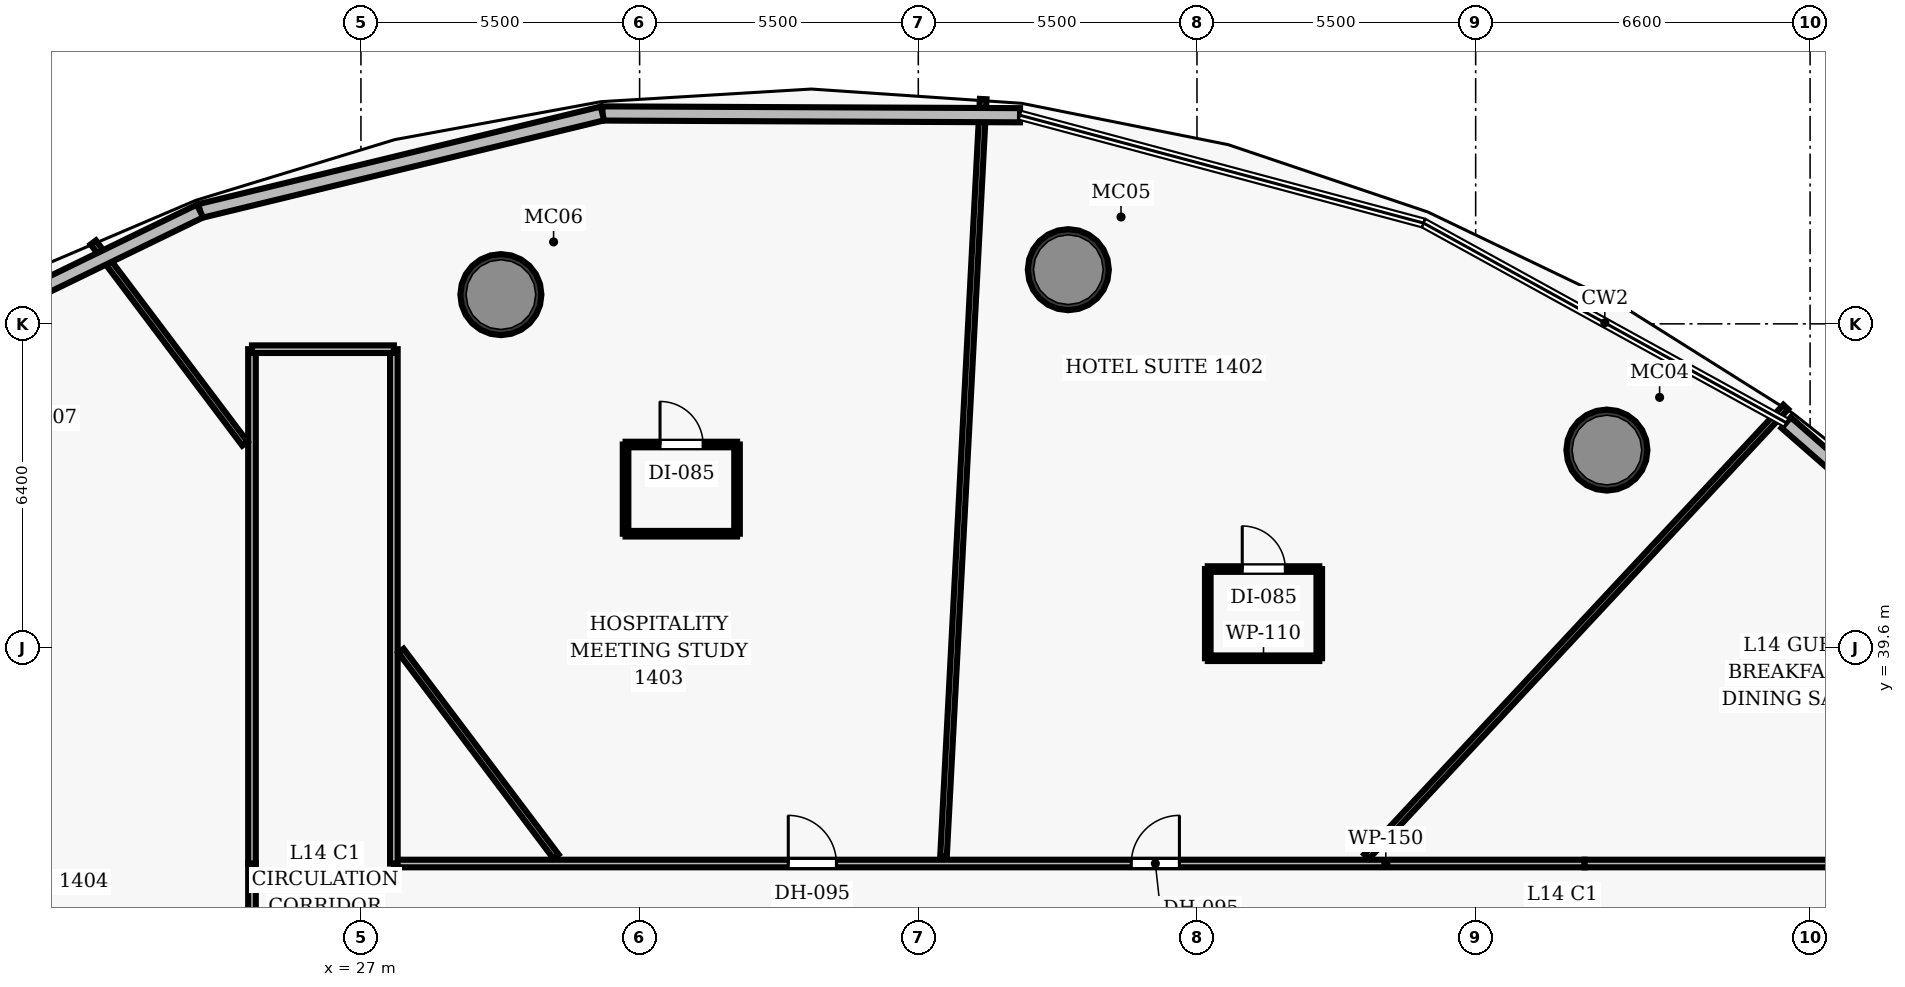
"""IFC4 building model, lengths in metres.
Left out: names, types, materials, properties, quantities, classifications, styles, units other than length and angle.
Written with IfcOpenShell. Run it as: python <this file> out.ifc"""

import sys

from ifc_helpers import new_model, si_unit, direction, frame, frame_2d, origin, origin_2d, place, context, subcontext, project, spatial, rectangle, hollow_circle, extrude, element, fill, save


model = new_model("IFC4")
c1 = context("Model", 3, precision=1e-05, world=origin(), true_north=direction((0.0, 1.0)))
c2 = subcontext(c1, "Body", "Model", "MODEL_VIEW")
j1 = project(units=[si_unit("LENGTHUNIT", "METRE"), si_unit("PLANEANGLEUNIT", "RADIAN")], contexts=[c1])
p1 = place(None, origin())
s1 = spatial("IfcSite", under=j1, at=p1, CompositionType="ELEMENT")
p2 = place(p1, origin())
s2 = spatial("IfcBuilding", under=s1, at=p2, CompositionType="ELEMENT")
p3 = place(p2, frame((0.0, 0.0, 65.9)))
s3 = spatial("IfcBuildingStorey", under=s2, at=p3, CompositionType="ELEMENT", Elevation=65.9)
for number, where, z_axis, x_axis in (
    (1, (51.59, 43.509, 0.0), (0.0, 0.0, 1.0), (1.0, 0.0, 0.0)),
    (2, (40.961, 47.069, 0.0), (0.0, 0.0, 1.0), (1.0, 0.0, 0.0)),
    (3, (29.762, 46.577, 0.0), (0.0, 0.0, 1.0), (1.0, 0.0, 0.0)),
):
    element("IfcColumn", number, at=place(p3, frame(where, z_axis=z_axis, x_axis=x_axis)), inside=s3, PredefinedType="COLUMN", context=c2, shape_type="SweptSolid", body=[
        extrude(hollow_circle(Radius=0.8, WallThickness=0.06, at=origin_2d()), origin(), (0.0, 0.0, 1.0), 3.5),
    ])
p4 = place(p3, frame((27.65, 35.35, 0.0), z_axis=(0.0, 0.0, 1.0), x_axis=(1.0, 0.0, 0.0)))
e4 = element("IfcWall", 4, at=p4, inside=s3, PredefinedType="PARTITIONING", context=c2, shape_type="SweptSolid", body=[
    extrude(rectangle(XDim=23.5, YDim=0.15, at=frame_2d((11.75, 0.0))), origin(), (0.0, 0.0, 1.0), 2.6),
])
p5 = place(p4, frame((14.553, 0.0, 0.0)))
e5 = element("IfcOpeningElement", 5, at=p5, cuts=e4, PredefinedType="OPENING", context=c2, shape_type="SweptSolid", body=[
    extrude(rectangle(XDim=0.95, YDim=2.15, at=frame_2d((0.475, 1.075))), frame((0.0, 0.085, 0.0), z_axis=(0.0, -1.0, 0.0), x_axis=(1.0, 0.0, 0.0)), (0.0, 0.0, 1.0), 0.17),
])
p6 = place(p4, frame((7.784, 0.0, 0.0)))
e6 = element("IfcOpeningElement", 6, at=p6, cuts=e4, PredefinedType="OPENING", context=c2, shape_type="SweptSolid", body=[
    extrude(rectangle(XDim=0.95, YDim=2.15, at=frame_2d((0.475, 1.075))), frame((0.0, 0.085, 0.0), z_axis=(0.0, -1.0, 0.0), x_axis=(1.0, 0.0, 0.0)), (0.0, 0.0, 1.0), 0.17),
])
p7 = place(p3, frame((24.85, 19.45, 0.0), z_axis=(0.0, 0.0, 1.0), x_axis=(0.0, 1.0, 0.0)))
e7 = element("IfcWall", 7, at=p7, inside=s3, PredefinedType="PARTITIONING", context=c2, shape_type="SweptSolid", body=[
    extrude(rectangle(XDim=15.9, YDim=0.15, at=frame_2d((7.95, 0.0))), origin(), (0.0, 0.0, 1.0), 2.6),
])
p8 = place(p7, frame((10.488, 0.0, 0.0)))
e8 = element("IfcOpeningElement", 8, at=p8, cuts=e7, PredefinedType="OPENING", context=c2, shape_type="SweptSolid", body=[
    extrude(rectangle(XDim=0.95, YDim=2.15, at=frame_2d((0.475, 1.075))), frame((0.0, 0.085, 0.0), z_axis=(0.0, -1.0, 0.0), x_axis=(1.0, 0.0, 0.0)), (0.0, 0.0, 1.0), 0.17),
])
p9 = place(p7, frame((6.958, 0.0, 0.0)))
e9 = element("IfcOpeningElement", 9, at=p9, cuts=e7, PredefinedType="OPENING", context=c2, shape_type="SweptSolid", body=[
    extrude(rectangle(XDim=0.95, YDim=2.15, at=frame_2d((0.475, 1.075))), frame((0.0, 0.085, 0.0), z_axis=(0.0, -1.0, 0.0), x_axis=(1.0, 0.0, 0.0)), (0.0, 0.0, 1.0), 0.17),
])
p10 = place(p3, frame((51.15, 35.35, 0.0), z_axis=(0.0, 0.0, 1.0), x_axis=(1.0, 0.0, 0.0)))
e10 = element("IfcWall", 10, at=p10, inside=s3, PredefinedType="PARTITIONING", context=c2, shape_type="SweptSolid", body=[
    extrude(rectangle(XDim=11.924, YDim=0.15, at=frame_2d((5.962, 0.0))), origin(), (0.0, 0.0, 1.0), 2.6),
])
for number, where, z_axis, x_axis in (
    (11, (24.85, 35.35, 0.0), (0.0, 0.0, 1.0), (0.0, 1.0, 0.0)),
    (12, (27.65, 35.35, 0.0), (0.0, 0.0, 1.0), (0.0, 1.0, 0.0)),
):
    element("IfcWall", number, at=place(p3, frame(where, z_axis=z_axis, x_axis=x_axis)), inside=s3, PredefinedType="PARTITIONING", context=c2, shape_type="SweptSolid", body=[
        extrude(rectangle(XDim=10.15, YDim=0.15, at=frame_2d((5.075, 0.0))), origin(), (0.0, 0.0, 1.0), 2.6),
    ])
p11 = place(p3, frame((24.85, 45.5, 0.0), z_axis=(0.0, 0.0, 1.0), x_axis=(1.0, 0.0, 0.0)))
e13 = element("IfcWall", 13, at=p11, inside=s3, PredefinedType="PARTITIONING", context=c2, shape_type="SweptSolid", body=[
    extrude(rectangle(XDim=2.8, YDim=0.15, at=frame_2d((1.4, 0.0))), origin(), (0.0, 0.0, 1.0), 2.6),
])
p12 = place(p3, frame((46.85, 35.49, 0.0), z_axis=(0.0, 0.0, 1.0), x_axis=(0.681992512367, 0.731359154639, 0.0)))
e14 = element("IfcWall", 14, at=p12, inside=s3, PredefinedType="PARTITIONING", context=c2, shape_type="SweptSolid", body=[
    extrude(rectangle(XDim=12.126, YDim=0.13, at=frame_2d((6.063, 0.0))), origin(), (0.0, 0.0, 1.0), 2.6),
])
p13 = place(p3, frame((38.497, 35.49, 0.0), z_axis=(0.0, 0.0, 1.0), x_axis=(0.052330232603, 0.998629834701, 0.0)))
e15 = element("IfcWall", 15, at=p13, inside=s3, PredefinedType="PARTITIONING", context=c2, shape_type="SweptSolid", body=[
    extrude(rectangle(XDim=14.967, YDim=0.13, at=frame_2d((7.483, 0.0))), origin(), (0.0, 0.0, 1.0), 2.6),
])
p14 = place(p3, frame((30.849, 35.49, 0.0), z_axis=(0.0, 0.0, 1.0), x_axis=(-0.601827595562, 0.798626035902, 0.0)))
e16 = element("IfcWall", 16, at=p14, inside=s3, PredefinedType="PARTITIONING", context=c2, shape_type="SweptSolid", body=[
    extrude(rectangle(XDim=5.083, YDim=0.13, at=frame_2d((2.541, 0.0))), origin(), (0.0, 0.0, 1.0), 2.6),
])
p15 = place(p3, frame((24.71, 43.636, 0.0), z_axis=(0.0, 0.0, 1.0), x_axis=(-0.601797590432, 0.798648646245, 0.0)))
e17 = element("IfcWall", 17, at=p15, inside=s3, PredefinedType="PARTITIONING", context=c2, shape_type="SweptSolid", body=[
    extrude(rectangle(XDim=4.972, YDim=0.13, at=frame_2d((2.486, 0.0))), origin(), (0.0, 0.0, 1.0), 2.6),
])
p16 = place(p3, frame((43.713, 39.401, 0.0), z_axis=(0.0, 0.0, 1.0), x_axis=(1.0, 0.0, 0.0)))
e18 = element("IfcWall", 18, at=p16, inside=s3, PredefinedType="PARTITIONING", context=c2, shape_type="SweptSolid", body=[
    extrude(rectangle(XDim=2.2, YDim=0.11, at=frame_2d((1.1, 0.0))), origin(), (0.0, 0.0, 1.0), 2.6),
])
p17 = place(p3, frame((43.713, 41.161, 0.0), z_axis=(0.0, 0.0, 1.0), x_axis=(1.0, 0.0, 0.0)))
e19 = element("IfcWall", 19, at=p17, inside=s3, PredefinedType="PARTITIONING", context=c2, shape_type="SweptSolid", body=[
    extrude(rectangle(XDim=2.2, YDim=0.11, at=frame_2d((1.1, 0.0))), origin(), (0.0, 0.0, 1.0), 2.6),
])
p18 = place(p17, frame((0.68, 0.0, 0.0)))
e20 = element("IfcOpeningElement", 20, at=p18, cuts=e19, PredefinedType="OPENING", context=c2, shape_type="SweptSolid", body=[
    extrude(rectangle(XDim=0.85, YDim=2.1, at=frame_2d((0.425, 1.05))), frame((0.0, 0.065, 0.0), z_axis=(0.0, -1.0, 0.0), x_axis=(1.0, 0.0, 0.0)), (0.0, 0.0, 1.0), 0.13),
])
for number, where, z_axis, x_axis in (
    (21, (43.713, 39.401, 0.0), (0.0, 0.0, 1.0), (0.0, 1.0, 0.0)),
    (22, (45.913, 39.401, 0.0), (0.0, 0.0, 1.0), (0.0, 1.0, 0.0)),
):
    element("IfcWall", number, at=place(p3, frame(where, z_axis=z_axis, x_axis=x_axis)), inside=s3, PredefinedType="PARTITIONING", context=c2, shape_type="SweptSolid", body=[
        extrude(rectangle(XDim=1.76, YDim=0.11, at=frame_2d((0.88, 0.0))), origin(), (0.0, 0.0, 1.0), 2.6),
    ])
p19 = place(p3, frame((32.223, 41.859, 0.0), z_axis=(0.0, 0.0, 1.0), x_axis=(1.0, 0.0, 0.0)))
e23 = element("IfcWall", 23, at=p19, inside=s3, PredefinedType="PARTITIONING", context=c2, shape_type="SweptSolid", body=[
    extrude(rectangle(XDim=2.2, YDim=0.11, at=frame_2d((1.1, 0.0))), origin(), (0.0, 0.0, 1.0), 2.6),
])
p20 = place(p3, frame((32.223, 43.619, 0.0), z_axis=(0.0, 0.0, 1.0), x_axis=(1.0, 0.0, 0.0)))
e24 = element("IfcWall", 24, at=p20, inside=s3, PredefinedType="PARTITIONING", context=c2, shape_type="SweptSolid", body=[
    extrude(rectangle(XDim=2.2, YDim=0.11, at=frame_2d((1.1, 0.0))), origin(), (0.0, 0.0, 1.0), 2.6),
])
p21 = place(p20, frame((0.68, 0.0, 0.0)))
e25 = element("IfcOpeningElement", 25, at=p21, cuts=e24, PredefinedType="OPENING", context=c2, shape_type="SweptSolid", body=[
    extrude(rectangle(XDim=0.85, YDim=2.1, at=frame_2d((0.425, 1.05))), frame((0.0, 0.065, 0.0), z_axis=(0.0, -1.0, 0.0), x_axis=(1.0, 0.0, 0.0)), (0.0, 0.0, 1.0), 0.13),
])
for number, where, z_axis, x_axis in (
    (26, (32.223, 41.859, 0.0), (0.0, 0.0, 1.0), (0.0, 1.0, 0.0)),
    (27, (34.423, 41.859, 0.0), (0.0, 0.0, 1.0), (0.0, 1.0, 0.0)),
):
    element("IfcWall", number, at=place(p3, frame(where, z_axis=z_axis, x_axis=x_axis)), inside=s3, PredefinedType="PARTITIONING", context=c2, shape_type="SweptSolid", body=[
        extrude(rectangle(XDim=1.76, YDim=0.11, at=frame_2d((0.88, 0.0))), origin(), (0.0, 0.0, 1.0), 2.6),
    ])
p22 = place(p3, frame((55.128, 44.05, 0.0), z_axis=(0.0, 0.0, 1.0), x_axis=(0.753362705376, -0.657605226673, 0.0)))
e28 = element("IfcWall", 28, at=p22, inside=s3, PredefinedType="SOLIDWALL", context=c2, shape_type="SweptSolid", body=[
    extrude(rectangle(XDim=7.845, YDim=0.28, at=frame_2d((3.922, 0.0))), origin(), (0.0, 0.0, 1.0), 3.25),
])
p23 = place(p3, frame((31.766, 50.152, 0.0), z_axis=(0.0, 0.0, 1.0), x_axis=(0.999990900598, -0.004265995843, 0.0)))
e29 = element("IfcWall", 29, at=p23, inside=s3, PredefinedType="SOLIDWALL", context=c2, shape_type="SweptSolid", body=[
    extrude(rectangle(XDim=8.241, YDim=0.28, at=frame_2d((4.121, 0.0))), origin(), (0.0, 0.0, 1.0), 3.25),
])
p24 = place(p3, frame((23.825, 48.227, 0.0), z_axis=(0.0, 0.0, 1.0), x_axis=(0.971850727629, 0.235597460104, 0.0)))
e30 = element("IfcWall", 30, at=p24, inside=s3, PredefinedType="SOLIDWALL", context=c2, shape_type="SweptSolid", body=[
    extrude(rectangle(XDim=8.171, YDim=0.28, at=frame_2d((4.085, 0.0))), origin(), (0.0, 0.0, 1.0), 3.25),
])
p25 = place(p3, frame((16.769, 44.798, 0.0), z_axis=(0.0, 0.0, 1.0), x_axis=(0.899430218245, 0.437064391718, 0.0)))
e31 = element("IfcWall", 31, at=p25, inside=s3, PredefinedType="SOLIDWALL", context=c2, shape_type="SweptSolid", body=[
    extrude(rectangle(XDim=7.845, YDim=0.28, at=frame_2d((3.922, 0.0))), origin(), (0.0, 0.0, 1.0), 3.25),
])
p26 = place(p5, origin())
e32 = element("IfcDoor", 32, at=p26, inside=s3, OperationType="SINGLE_SWING_RIGHT", PredefinedType="DOOR", context=c2, shape_type="SweptSolid", body=[
    extrude(rectangle(XDim=0.95, YDim=2.15, at=frame_2d((0.475, 1.075))), frame((0.0, 0.025, 0.0), z_axis=(0.0, -1.0, 0.0), x_axis=(1.0, 0.0, 0.0)), (0.0, 0.0, 1.0), 0.05),
])
fill(e5, e32)
p27 = place(p18, origin())
e33 = element("IfcDoor", 33, at=p27, inside=s3, OperationType="SINGLE_SWING_LEFT", PredefinedType="DOOR", context=c2, shape_type="SweptSolid", body=[
    extrude(rectangle(XDim=0.85, YDim=2.1, at=frame_2d((0.425, 1.05))), frame((0.0, 0.025, 0.0), z_axis=(0.0, -1.0, 0.0), x_axis=(1.0, 0.0, 0.0)), (0.0, 0.0, 1.0), 0.05),
])
fill(e20, e33)
p28 = place(p6, origin())
e34 = element("IfcDoor", 34, at=p28, inside=s3, OperationType="SINGLE_SWING_LEFT", PredefinedType="DOOR", context=c2, shape_type="SweptSolid", body=[
    extrude(rectangle(XDim=0.95, YDim=2.15, at=frame_2d((0.475, 1.075))), frame((0.0, 0.025, 0.0), z_axis=(0.0, -1.0, 0.0), x_axis=(1.0, 0.0, 0.0)), (0.0, 0.0, 1.0), 0.05),
])
fill(e6, e34)
p29 = place(p21, origin())
e35 = element("IfcDoor", 35, at=p29, inside=s3, OperationType="SINGLE_SWING_LEFT", PredefinedType="DOOR", context=c2, shape_type="SweptSolid", body=[
    extrude(rectangle(XDim=0.85, YDim=2.1, at=frame_2d((0.425, 1.05))), frame((0.0, 0.025, 0.0), z_axis=(0.0, -1.0, 0.0), x_axis=(1.0, 0.0, 0.0)), (0.0, 0.0, 1.0), 0.05),
])
fill(e25, e35)
save(model, sys.argv[1])
